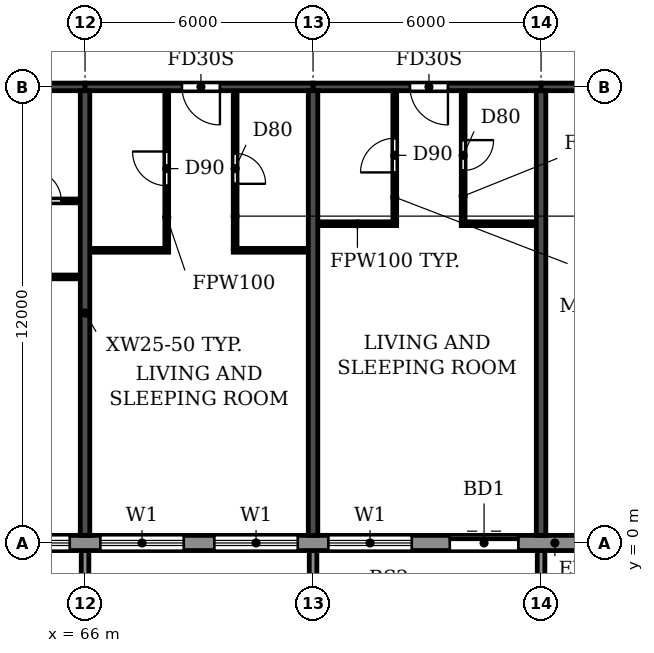
"""IFC4 building model, lengths in metres.
Left out: names, types, materials, properties, quantities, classifications, styles, units other than length and angle.
Written with IfcOpenShell. Run it as: python <this file> out.ifc"""

import sys

from ifc_helpers import new_model, si_unit, direction, frame, frame_2d, origin, place, context, subcontext, project, spatial, polyline, rectangle, outline, extrude, source, transform, mapped, element, fill, save


model = new_model("IFC4")
c1 = context("Model", 3, precision=1e-05, world=origin(), true_north=direction((0.0, 1.0)))
c2 = subcontext(c1, "Body", "Model", "MODEL_VIEW")
j1 = project(units=[si_unit("LENGTHUNIT", "METRE"), si_unit("PLANEANGLEUNIT", "RADIAN")], contexts=[c1])
p1 = place(None, origin())
s1 = spatial("IfcSite", under=j1, at=p1, CompositionType="ELEMENT")
p2 = place(p1, origin())
s2 = spatial("IfcBuilding", under=s1, at=p2, CompositionType="ELEMENT")
p3 = place(p2, frame((0.0, 0.0, 241.2)))
s3 = spatial("IfcBuildingStorey", under=s2, at=p3, CompositionType="ELEMENT", Elevation=241.2)
for number, where, z_axis, x_axis in (
    (1, (66.0, 0.2, 0.0), (0.0, 0.0, 1.0), (0.0, 1.0, 0.0)),
    (2, (72.0, 0.2, 0.0), (0.0, 0.0, 1.0), (0.0, 1.0, 0.0)),
    (3, (78.0, 0.2, 0.0), (0.0, 0.0, 1.0), (0.0, 1.0, 0.0)),
):
    element("IfcWall", number, at=place(p3, frame(where, z_axis=z_axis, x_axis=x_axis)), inside=s3, PredefinedType="SHEAR", context=c2, shape_type="SweptSolid", body=[
        extrude(rectangle(XDim=11.7, YDim=0.25, at=frame_2d((5.85, 0.0))), origin(), (0.0, 0.0, 1.0), 3.08),
    ])
p4 = place(p3, frame((60.0, 12.0, 0.0), z_axis=(0.0, 0.0, 1.0), x_axis=(1.0, 0.0, 0.0)))
e4 = element("IfcWall", 4, at=p4, inside=s3, PredefinedType="SHEAR", context=c2, shape_type="SweptSolid", body=[
    extrude(rectangle(XDim=6.0, YDim=0.2, at=frame_2d((3.0, 0.0))), origin(), (0.0, 0.0, 1.0), 2.48),
])
p5 = place(p4, frame((2.55, 0.0, 0.0)))
e5 = element("IfcOpeningElement", 5, at=p5, cuts=e4, PredefinedType="OPENING", context=c2, shape_type="SweptSolid", body=[
    extrude(rectangle(XDim=1.0, YDim=2.1, at=frame_2d((0.5, 1.05))), frame((0.0, 0.11, 0.0), z_axis=(0.0, -1.0, 0.0), x_axis=(1.0, 0.0, 0.0)), (0.0, 0.0, 1.0), 0.22),
])
p6 = place(p3, frame((66.0, 12.0, 0.0), z_axis=(0.0, 0.0, 1.0), x_axis=(1.0, 0.0, 0.0)))
e6 = element("IfcWall", 6, at=p6, inside=s3, PredefinedType="SHEAR", context=c2, shape_type="SweptSolid", body=[
    extrude(rectangle(XDim=6.0, YDim=0.2, at=frame_2d((3.0, 0.0))), origin(), (0.0, 0.0, 1.0), 2.48),
])
p7 = place(p6, frame((2.55, 0.0, 0.0)))
e7 = element("IfcOpeningElement", 7, at=p7, cuts=e6, PredefinedType="OPENING", context=c2, shape_type="SweptSolid", body=[
    extrude(rectangle(XDim=1.0, YDim=2.1, at=frame_2d((0.5, 1.05))), frame((0.0, 0.11, 0.0), z_axis=(0.0, -1.0, 0.0), x_axis=(1.0, 0.0, 0.0)), (0.0, 0.0, 1.0), 0.22),
])
p8 = place(p3, frame((72.0, 12.0, 0.0), z_axis=(0.0, 0.0, 1.0), x_axis=(1.0, 0.0, 0.0)))
e8 = element("IfcWall", 8, at=p8, inside=s3, PredefinedType="SHEAR", context=c2, shape_type="SweptSolid", body=[
    extrude(rectangle(XDim=6.0, YDim=0.2, at=frame_2d((3.0, 0.0))), origin(), (0.0, 0.0, 1.0), 2.48),
])
p9 = place(p8, frame((2.55, 0.0, 0.0)))
e9 = element("IfcOpeningElement", 9, at=p9, cuts=e8, PredefinedType="OPENING", context=c2, shape_type="SweptSolid", body=[
    extrude(rectangle(XDim=1.0, YDim=2.1, at=frame_2d((0.5, 1.05))), frame((0.0, 0.11, 0.0), z_axis=(0.0, -1.0, 0.0), x_axis=(1.0, 0.0, 0.0)), (0.0, 0.0, 1.0), 0.22),
])
p10 = place(p3, frame((78.0, 12.0, 0.0), z_axis=(0.0, 0.0, 1.0), x_axis=(1.0, 0.0, 0.0)))
e10 = element("IfcWall", 10, at=p10, inside=s3, PredefinedType="SHEAR", context=c2, shape_type="SweptSolid", body=[
    extrude(rectangle(XDim=5.8, YDim=0.2, at=frame_2d((2.9, 0.0))), origin(), (0.0, 0.0, 1.0), 2.48),
])
p11 = place(p10, frame((2.5, 0.0, 0.0)))
e11 = element("IfcOpeningElement", 11, at=p11, cuts=e10, PredefinedType="OPENING", context=c2, shape_type="SweptSolid", body=[
    extrude(rectangle(XDim=1.0, YDim=2.1, at=frame_2d((0.5, 1.05))), frame((0.0, 0.11, 0.0), z_axis=(0.0, -1.0, 0.0), x_axis=(1.0, 0.0, 0.0)), (0.0, 0.0, 1.0), 0.22),
])
p12 = place(p3, frame((22.683, 0.0, 0.0), z_axis=(0.0, 0.0, 1.0), x_axis=(1.0, 0.0, 0.0)))
e12 = element("IfcWall", 12, at=p12, inside=s3, PredefinedType="STANDARD", context=c2, shape_type="SweptSolid", body=[
    extrude(rectangle(XDim=56.634, YDim=0.4, at=frame_2d((28.317, 0.0))), origin(), (0.0, 0.0, 1.0), 3.08),
])
p13 = place(p12, frame((1.717, 0.0, 0.9)))
e13 = element("IfcOpeningElement", 13, at=p13, cuts=e12, PredefinedType="OPENING", context=c2, shape_type="SweptSolid", body=[
    extrude(rectangle(XDim=2.2, YDim=1.5, at=frame_2d((1.1, 0.75))), frame((0.0, 0.21, 0.0), z_axis=(0.0, -1.0, 0.0), x_axis=(1.0, 0.0, 0.0)), (0.0, 0.0, 1.0), 0.42),
])
p14 = place(p12, frame((4.917, 0.0, 0.0)))
e14 = element("IfcOpeningElement", 14, at=p14, cuts=e12, PredefinedType="OPENING", context=c2, shape_type="SweptSolid", body=[
    extrude(rectangle(XDim=1.8, YDim=2.4, at=frame_2d((0.9, 1.2))), frame((0.0, 0.21, 0.0), z_axis=(0.0, -1.0, 0.0), x_axis=(1.0, 0.0, 0.0)), (0.0, 0.0, 1.0), 0.42),
])
p15 = place(p12, frame((7.717, 0.0, 0.9)))
e15 = element("IfcOpeningElement", 15, at=p15, cuts=e12, PredefinedType="OPENING", context=c2, shape_type="SweptSolid", body=[
    extrude(rectangle(XDim=2.2, YDim=1.5, at=frame_2d((1.1, 0.75))), frame((0.0, 0.21, 0.0), z_axis=(0.0, -1.0, 0.0), x_axis=(1.0, 0.0, 0.0)), (0.0, 0.0, 1.0), 0.42),
])
p16 = place(p12, frame((10.717, 0.0, 0.9)))
e16 = element("IfcOpeningElement", 16, at=p16, cuts=e12, PredefinedType="OPENING", context=c2, shape_type="SweptSolid", body=[
    extrude(rectangle(XDim=2.2, YDim=1.5, at=frame_2d((1.1, 0.75))), frame((0.0, 0.21, 0.0), z_axis=(0.0, -1.0, 0.0), x_axis=(1.0, 0.0, 0.0)), (0.0, 0.0, 1.0), 0.42),
])
p17 = place(p12, frame((13.717, 0.0, 0.9)))
e17 = element("IfcOpeningElement", 17, at=p17, cuts=e12, PredefinedType="OPENING", context=c2, shape_type="SweptSolid", body=[
    extrude(rectangle(XDim=2.2, YDim=1.5, at=frame_2d((1.1, 0.75))), frame((0.0, 0.21, 0.0), z_axis=(0.0, -1.0, 0.0), x_axis=(1.0, 0.0, 0.0)), (0.0, 0.0, 1.0), 0.42),
])
p18 = place(p12, frame((16.917, 0.0, 0.0)))
e18 = element("IfcOpeningElement", 18, at=p18, cuts=e12, PredefinedType="OPENING", context=c2, shape_type="SweptSolid", body=[
    extrude(rectangle(XDim=1.8, YDim=2.4, at=frame_2d((0.9, 1.2))), frame((0.0, 0.21, 0.0), z_axis=(0.0, -1.0, 0.0), x_axis=(1.0, 0.0, 0.0)), (0.0, 0.0, 1.0), 0.42),
])
p19 = place(p12, frame((19.717, 0.0, 0.9)))
e19 = element("IfcOpeningElement", 19, at=p19, cuts=e12, PredefinedType="OPENING", context=c2, shape_type="SweptSolid", body=[
    extrude(rectangle(XDim=2.2, YDim=1.5, at=frame_2d((1.1, 0.75))), frame((0.0, 0.21, 0.0), z_axis=(0.0, -1.0, 0.0), x_axis=(1.0, 0.0, 0.0)), (0.0, 0.0, 1.0), 0.42),
])
p20 = place(p12, frame((22.717, 0.0, 0.9)))
e20 = element("IfcOpeningElement", 20, at=p20, cuts=e12, PredefinedType="OPENING", context=c2, shape_type="SweptSolid", body=[
    extrude(rectangle(XDim=2.2, YDim=1.5, at=frame_2d((1.1, 0.75))), frame((0.0, 0.21, 0.0), z_axis=(0.0, -1.0, 0.0), x_axis=(1.0, 0.0, 0.0)), (0.0, 0.0, 1.0), 0.42),
])
p21 = place(p12, frame((25.717, 0.0, 0.9)))
e21 = element("IfcOpeningElement", 21, at=p21, cuts=e12, PredefinedType="OPENING", context=c2, shape_type="SweptSolid", body=[
    extrude(rectangle(XDim=2.2, YDim=1.5, at=frame_2d((1.1, 0.75))), frame((0.0, 0.21, 0.0), z_axis=(0.0, -1.0, 0.0), x_axis=(1.0, 0.0, 0.0)), (0.0, 0.0, 1.0), 0.42),
])
p22 = place(p12, frame((28.717, 0.0, 0.9)))
e22 = element("IfcOpeningElement", 22, at=p22, cuts=e12, PredefinedType="OPENING", context=c2, shape_type="SweptSolid", body=[
    extrude(rectangle(XDim=2.2, YDim=1.5, at=frame_2d((1.1, 0.75))), frame((0.0, 0.21, 0.0), z_axis=(0.0, -1.0, 0.0), x_axis=(1.0, 0.0, 0.0)), (0.0, 0.0, 1.0), 0.42),
])
p23 = place(p12, frame((31.717, 0.0, 0.9)))
e23 = element("IfcOpeningElement", 23, at=p23, cuts=e12, PredefinedType="OPENING", context=c2, shape_type="SweptSolid", body=[
    extrude(rectangle(XDim=2.2, YDim=1.5, at=frame_2d((1.1, 0.75))), frame((0.0, 0.21, 0.0), z_axis=(0.0, -1.0, 0.0), x_axis=(1.0, 0.0, 0.0)), (0.0, 0.0, 1.0), 0.42),
])
p24 = place(p12, frame((34.717, 0.0, 0.9)))
e24 = element("IfcOpeningElement", 24, at=p24, cuts=e12, PredefinedType="OPENING", context=c2, shape_type="SweptSolid", body=[
    extrude(rectangle(XDim=2.2, YDim=1.5, at=frame_2d((1.1, 0.75))), frame((0.0, 0.21, 0.0), z_axis=(0.0, -1.0, 0.0), x_axis=(1.0, 0.0, 0.0)), (0.0, 0.0, 1.0), 0.42),
])
p25 = place(p12, frame((37.917, 0.0, 0.0)))
e25 = element("IfcOpeningElement", 25, at=p25, cuts=e12, PredefinedType="OPENING", context=c2, shape_type="SweptSolid", body=[
    extrude(rectangle(XDim=1.8, YDim=2.4, at=frame_2d((0.9, 1.2))), frame((0.0, 0.21, 0.0), z_axis=(0.0, -1.0, 0.0), x_axis=(1.0, 0.0, 0.0)), (0.0, 0.0, 1.0), 0.42),
])
p26 = place(p12, frame((40.717, 0.0, 0.9)))
e26 = element("IfcOpeningElement", 26, at=p26, cuts=e12, PredefinedType="OPENING", context=c2, shape_type="SweptSolid", body=[
    extrude(rectangle(XDim=2.2, YDim=1.5, at=frame_2d((1.1, 0.75))), frame((0.0, 0.21, 0.0), z_axis=(0.0, -1.0, 0.0), x_axis=(1.0, 0.0, 0.0)), (0.0, 0.0, 1.0), 0.42),
])
p27 = place(p12, frame((43.717, 0.0, 0.9)))
e27 = element("IfcOpeningElement", 27, at=p27, cuts=e12, PredefinedType="OPENING", context=c2, shape_type="SweptSolid", body=[
    extrude(rectangle(XDim=2.2, YDim=1.5, at=frame_2d((1.1, 0.75))), frame((0.0, 0.21, 0.0), z_axis=(0.0, -1.0, 0.0), x_axis=(1.0, 0.0, 0.0)), (0.0, 0.0, 1.0), 0.42),
])
p28 = place(p12, frame((46.717, 0.0, 0.9)))
e28 = element("IfcOpeningElement", 28, at=p28, cuts=e12, PredefinedType="OPENING", context=c2, shape_type="SweptSolid", body=[
    extrude(rectangle(XDim=2.2, YDim=1.5, at=frame_2d((1.1, 0.75))), frame((0.0, 0.21, 0.0), z_axis=(0.0, -1.0, 0.0), x_axis=(1.0, 0.0, 0.0)), (0.0, 0.0, 1.0), 0.42),
])
p29 = place(p12, frame((49.717, 0.0, 0.9)))
e29 = element("IfcOpeningElement", 29, at=p29, cuts=e12, PredefinedType="OPENING", context=c2, shape_type="SweptSolid", body=[
    extrude(rectangle(XDim=2.2, YDim=1.5, at=frame_2d((1.1, 0.75))), frame((0.0, 0.21, 0.0), z_axis=(0.0, -1.0, 0.0), x_axis=(1.0, 0.0, 0.0)), (0.0, 0.0, 1.0), 0.42),
])
p30 = place(p12, frame((52.917, 0.0, 0.0)))
e30 = element("IfcOpeningElement", 30, at=p30, cuts=e12, PredefinedType="OPENING", context=c2, shape_type="SweptSolid", body=[
    extrude(rectangle(XDim=1.8, YDim=2.4, at=frame_2d((0.9, 1.2))), frame((0.0, 0.21, 0.0), z_axis=(0.0, -1.0, 0.0), x_axis=(1.0, 0.0, 0.0)), (0.0, 0.0, 1.0), 0.42),
])
m1 = source(origin(), c2, "Body", "SweptSolid", [
    extrude(outline(polyline([(0.0, 0.0), (0.2, 0.0), (0.2, 1.65), (0.0, 1.65), (0.0, 0.0)])), origin(), (0.0, 0.0, 1.0), 3.1),
])
for number, where in (
    (31, (65.9, -1.85, 0.0)),
    (32, (71.9, -1.85, 0.0)),
    (33, (77.9, -1.85, 0.0)),
):
    element("IfcWall", number, at=place(p3, frame(where)), inside=s3, PredefinedType="STANDARD", context=c2, shape_type="MappedRepresentation", body=[
        mapped(m1, transform((0.0, 0.0, 0.0))),
    ])
p31 = place(p3, frame((62.95, 7.0, 0.0), z_axis=(0.0, 0.0, 1.0), x_axis=(1.0, 0.0, 0.0)))
e34 = element("IfcWall", 34, at=p31, inside=s3, PredefinedType="PARTITIONING", context=c2, shape_type="SweptSolid", body=[
    extrude(rectangle(XDim=2.915, YDim=0.1, at=frame_2d((1.458, 0.0))), origin(), (0.0, 0.0, 1.0), 3.08),
])
p32 = place(p31, frame((0.55, 0.0, 0.0)))
e35 = element("IfcOpeningElement", 35, at=p32, cuts=e34, PredefinedType="OPENING", context=c2, shape_type="SweptSolid", body=[
    extrude(rectangle(XDim=0.9, YDim=2.1, at=frame_2d((0.45, 1.05))), frame((0.0, 0.06, 0.0), z_axis=(0.0, -1.0, 0.0), x_axis=(1.0, 0.0, 0.0)), (0.0, 0.0, 1.0), 0.12),
])
p33 = place(p3, frame((66.135, 7.7, 0.0), z_axis=(0.0, 0.0, 1.0), x_axis=(1.0, 0.0, 0.0)))
e36 = element("IfcWall", 36, at=p33, inside=s3, PredefinedType="PARTITIONING", context=c2, shape_type="SweptSolid", body=[
    extrude(rectangle(XDim=2.065, YDim=0.1, at=frame_2d((1.032, 0.0))), origin(), (0.0, 0.0, 1.0), 3.08),
])
p34 = place(p3, frame((69.9, 7.7, 0.0), z_axis=(0.0, 0.0, 1.0), x_axis=(1.0, 0.0, 0.0)))
e37 = element("IfcWall", 37, at=p34, inside=s3, PredefinedType="PARTITIONING", context=c2, shape_type="SweptSolid", body=[
    extrude(rectangle(XDim=1.965, YDim=0.1, at=frame_2d((0.982, 0.0))), origin(), (0.0, 0.0, 1.0), 3.08),
])
p35 = place(p3, frame((72.135, 8.4, 0.0), z_axis=(0.0, 0.0, 1.0), x_axis=(1.0, 0.0, 0.0)))
e38 = element("IfcWall", 38, at=p35, inside=s3, PredefinedType="PARTITIONING", context=c2, shape_type="SweptSolid", body=[
    extrude(rectangle(XDim=2.065, YDim=0.1, at=frame_2d((1.032, 0.0))), origin(), (0.0, 0.0, 1.0), 3.08),
])
p36 = place(p3, frame((75.9, 8.4, 0.0), z_axis=(0.0, 0.0, 1.0), x_axis=(1.0, 0.0, 0.0)))
e39 = element("IfcWall", 39, at=p36, inside=s3, PredefinedType="PARTITIONING", context=c2, shape_type="SweptSolid", body=[
    extrude(rectangle(XDim=1.965, YDim=0.1, at=frame_2d((0.982, 0.0))), origin(), (0.0, 0.0, 1.0), 3.08),
])
p37 = place(p3, frame((63.9, 9.0, 0.0), z_axis=(0.0, 0.0, 1.0), x_axis=(1.0, 0.0, 0.0)))
e40 = element("IfcWall", 40, at=p37, inside=s3, PredefinedType="PARTITIONING", context=c2, shape_type="SweptSolid", body=[
    extrude(rectangle(XDim=1.965, YDim=0.1, at=frame_2d((0.982, 0.0))), origin(), (0.0, 0.0, 1.0), 3.08),
])
p38 = place(p37, frame((0.675, 0.0, 0.0)))
e41 = element("IfcOpeningElement", 41, at=p38, cuts=e40, PredefinedType="OPENING", context=c2, shape_type="SweptSolid", body=[
    extrude(rectangle(XDim=0.8, YDim=2.1, at=frame_2d((0.4, 1.05))), frame((0.0, 0.06, 0.0), z_axis=(0.0, -1.0, 0.0), x_axis=(1.0, 0.0, 0.0)), (0.0, 0.0, 1.0), 0.12),
])
p39 = place(p3, frame((68.15, 7.75, 0.0), z_axis=(0.0, 0.0, 1.0), x_axis=(0.0, 1.0, 0.0)))
e42 = element("IfcWall", 42, at=p39, inside=s3, PredefinedType="PARTITIONING", context=c2, shape_type="SweptSolid", body=[
    extrude(rectangle(XDim=4.14, YDim=0.1, at=frame_2d((2.07, 0.0))), origin(), (0.0, 0.0, 1.0), 3.08),
])
p40 = place(p39, frame((1.65, 0.0, 0.0)))
e43 = element("IfcOpeningElement", 43, at=p40, cuts=e42, PredefinedType="OPENING", context=c2, shape_type="SweptSolid", body=[
    extrude(rectangle(XDim=0.9, YDim=2.1, at=frame_2d((0.45, 1.05))), frame((0.0, 0.06, 0.0), z_axis=(0.0, -1.0, 0.0), x_axis=(1.0, 0.0, 0.0)), (0.0, 0.0, 1.0), 0.12),
])
p41 = place(p3, frame((69.95, 7.75, 0.0), z_axis=(0.0, 0.0, 1.0), x_axis=(0.0, 1.0, 0.0)))
e44 = element("IfcWall", 44, at=p41, inside=s3, PredefinedType="PARTITIONING", context=c2, shape_type="SweptSolid", body=[
    extrude(rectangle(XDim=4.14, YDim=0.1, at=frame_2d((2.07, 0.0))), origin(), (0.0, 0.0, 1.0), 3.08),
])
p42 = place(p41, frame((1.7, 0.0, 0.0)))
e45 = element("IfcOpeningElement", 45, at=p42, cuts=e44, PredefinedType="OPENING", context=c2, shape_type="SweptSolid", body=[
    extrude(rectangle(XDim=0.8, YDim=2.1, at=frame_2d((0.4, 1.05))), frame((0.0, 0.06, 0.0), z_axis=(0.0, -1.0, 0.0), x_axis=(1.0, 0.0, 0.0)), (0.0, 0.0, 1.0), 0.12),
])
p43 = place(p3, frame((74.15, 8.45, 0.0), z_axis=(0.0, 0.0, 1.0), x_axis=(0.0, 1.0, 0.0)))
e46 = element("IfcWall", 46, at=p43, inside=s3, PredefinedType="PARTITIONING", context=c2, shape_type="SweptSolid", body=[
    extrude(rectangle(XDim=3.44, YDim=0.1, at=frame_2d((1.72, 0.0))), origin(), (0.0, 0.0, 1.0), 3.08),
])
p44 = place(p43, frame((1.3, 0.0, 0.0)))
e47 = element("IfcOpeningElement", 47, at=p44, cuts=e46, PredefinedType="OPENING", context=c2, shape_type="SweptSolid", body=[
    extrude(rectangle(XDim=0.9, YDim=2.1, at=frame_2d((0.45, 1.05))), frame((0.0, 0.06, 0.0), z_axis=(0.0, -1.0, 0.0), x_axis=(1.0, 0.0, 0.0)), (0.0, 0.0, 1.0), 0.12),
])
p45 = place(p3, frame((75.95, 8.45, 0.0), z_axis=(0.0, 0.0, 1.0), x_axis=(0.0, 1.0, 0.0)))
e48 = element("IfcWall", 48, at=p45, inside=s3, PredefinedType="PARTITIONING", context=c2, shape_type="SweptSolid", body=[
    extrude(rectangle(XDim=3.44, YDim=0.1, at=frame_2d((1.72, 0.0))), origin(), (0.0, 0.0, 1.0), 3.08),
])
p46 = place(p45, frame((1.35, 0.0, 0.0)))
e49 = element("IfcOpeningElement", 49, at=p46, cuts=e48, PredefinedType="OPENING", context=c2, shape_type="SweptSolid", body=[
    extrude(rectangle(XDim=0.8, YDim=2.1, at=frame_2d((0.4, 1.05))), frame((0.0, 0.06, 0.0), z_axis=(0.0, -1.0, 0.0), x_axis=(1.0, 0.0, 0.0)), (0.0, 0.0, 1.0), 0.12),
])
p47 = place(p26, origin())
e50 = element("IfcWindow", 50, at=p47, inside=s3, PartitioningType="DOUBLE_PANEL_HORIZONTAL", PredefinedType="WINDOW", context=c2, shape_type="SweptSolid", body=[
    extrude(rectangle(XDim=2.2, YDim=1.5, at=frame_2d((1.1, 0.75))), frame((0.0, 0.03, 0.0), z_axis=(0.0, -1.0, 0.0), x_axis=(1.0, 0.0, 0.0)), (0.0, 0.0, 1.0), 0.06),
])
fill(e26, e50)
p48 = place(p27, origin())
e51 = element("IfcWindow", 51, at=p48, inside=s3, PartitioningType="DOUBLE_PANEL_HORIZONTAL", PredefinedType="WINDOW", context=c2, shape_type="SweptSolid", body=[
    extrude(rectangle(XDim=2.2, YDim=1.5, at=frame_2d((1.1, 0.75))), frame((0.0, 0.03, 0.0), z_axis=(0.0, -1.0, 0.0), x_axis=(1.0, 0.0, 0.0)), (0.0, 0.0, 1.0), 0.06),
])
fill(e27, e51)
p49 = place(p28, origin())
e52 = element("IfcWindow", 52, at=p49, inside=s3, PartitioningType="DOUBLE_PANEL_HORIZONTAL", PredefinedType="WINDOW", context=c2, shape_type="SweptSolid", body=[
    extrude(rectangle(XDim=2.2, YDim=1.5, at=frame_2d((1.1, 0.75))), frame((0.0, 0.03, 0.0), z_axis=(0.0, -1.0, 0.0), x_axis=(1.0, 0.0, 0.0)), (0.0, 0.0, 1.0), 0.06),
])
fill(e28, e52)
p50 = place(p29, origin())
e53 = element("IfcWindow", 53, at=p50, inside=s3, PartitioningType="DOUBLE_PANEL_HORIZONTAL", PredefinedType="WINDOW", context=c2, shape_type="SweptSolid", body=[
    extrude(rectangle(XDim=2.2, YDim=1.5, at=frame_2d((1.1, 0.75))), frame((0.0, 0.03, 0.0), z_axis=(0.0, -1.0, 0.0), x_axis=(1.0, 0.0, 0.0)), (0.0, 0.0, 1.0), 0.06),
])
fill(e29, e53)
p51 = place(p30, origin())
e54 = element("IfcDoor", 54, at=p51, inside=s3, OperationType="DOUBLE_DOOR_SLIDING", PredefinedType="DOOR", context=c2, shape_type="SweptSolid", body=[
    extrude(rectangle(XDim=1.8, YDim=2.4, at=frame_2d((0.9, 1.2))), frame((0.0, 0.025, 0.0), z_axis=(0.0, -1.0, 0.0), x_axis=(1.0, 0.0, 0.0)), (0.0, 0.0, 1.0), 0.05),
])
fill(e30, e54)
p52 = place(p38, origin())
e55 = element("IfcDoor", 55, at=p52, inside=s3, OperationType="SINGLE_SWING_LEFT", PredefinedType="DOOR", context=c2, shape_type="SweptSolid", body=[
    extrude(rectangle(XDim=0.8, YDim=2.1, at=frame_2d((0.4, 1.05))), frame((0.0, 0.025, 0.0), z_axis=(0.0, -1.0, 0.0), x_axis=(1.0, 0.0, 0.0)), (0.0, 0.0, 1.0), 0.05),
])
fill(e41, e55)
p53 = place(p40, origin())
e56 = element("IfcDoor", 56, at=p53, inside=s3, OperationType="SINGLE_SWING_RIGHT", PredefinedType="DOOR", context=c2, shape_type="SweptSolid", body=[
    extrude(rectangle(XDim=0.9, YDim=2.1, at=frame_2d((0.45, 1.05))), frame((0.0, 0.025, 0.0), z_axis=(0.0, -1.0, 0.0), x_axis=(1.0, 0.0, 0.0)), (0.0, 0.0, 1.0), 0.05),
])
fill(e43, e56)
p54 = place(p7, frame((1.0, 0.0, 0.0), z_axis=(0.0, 0.0, 1.0), x_axis=(-1.0, 0.0, 0.0)))
e57 = element("IfcDoor", 57, at=p54, inside=s3, OperationType="SINGLE_SWING_LEFT", PredefinedType="DOOR", context=c2, shape_type="SweptSolid", body=[
    extrude(rectangle(XDim=1.0, YDim=2.1, at=frame_2d((0.5, 1.05))), frame((0.0, 0.025, 0.0), z_axis=(0.0, -1.0, 0.0), x_axis=(1.0, 0.0, 0.0)), (0.0, 0.0, 1.0), 0.05),
])
fill(e7, e57)
p55 = place(p42, frame((0.8, 0.0, 0.0), z_axis=(0.0, 0.0, 1.0), x_axis=(-1.0, 0.0, 0.0)))
e58 = element("IfcDoor", 58, at=p55, inside=s3, OperationType="SINGLE_SWING_RIGHT", PredefinedType="DOOR", context=c2, shape_type="SweptSolid", body=[
    extrude(rectangle(XDim=0.8, YDim=2.1, at=frame_2d((0.4, 1.05))), frame((0.0, 0.025, 0.0), z_axis=(0.0, -1.0, 0.0), x_axis=(1.0, 0.0, 0.0)), (0.0, 0.0, 1.0), 0.05),
])
fill(e45, e58)
p56 = place(p44, origin())
e59 = element("IfcDoor", 59, at=p56, inside=s3, OperationType="SINGLE_SWING_LEFT", PredefinedType="DOOR", context=c2, shape_type="SweptSolid", body=[
    extrude(rectangle(XDim=0.9, YDim=2.1, at=frame_2d((0.45, 1.05))), frame((0.0, 0.025, 0.0), z_axis=(0.0, -1.0, 0.0), x_axis=(1.0, 0.0, 0.0)), (0.0, 0.0, 1.0), 0.05),
])
fill(e47, e59)
p57 = place(p9, frame((1.0, 0.0, 0.0), z_axis=(0.0, 0.0, 1.0), x_axis=(-1.0, 0.0, 0.0)))
e60 = element("IfcDoor", 60, at=p57, inside=s3, OperationType="SINGLE_SWING_LEFT", PredefinedType="DOOR", context=c2, shape_type="SweptSolid", body=[
    extrude(rectangle(XDim=1.0, YDim=2.1, at=frame_2d((0.5, 1.05))), frame((0.0, 0.025, 0.0), z_axis=(0.0, -1.0, 0.0), x_axis=(1.0, 0.0, 0.0)), (0.0, 0.0, 1.0), 0.05),
])
fill(e9, e60)
p58 = place(p46, frame((0.8, 0.0, 0.0), z_axis=(0.0, 0.0, 1.0), x_axis=(-1.0, 0.0, 0.0)))
e61 = element("IfcDoor", 61, at=p58, inside=s3, OperationType="SINGLE_SWING_LEFT", PredefinedType="DOOR", context=c2, shape_type="SweptSolid", body=[
    extrude(rectangle(XDim=0.8, YDim=2.1, at=frame_2d((0.4, 1.05))), frame((0.0, 0.025, 0.0), z_axis=(0.0, -1.0, 0.0), x_axis=(1.0, 0.0, 0.0)), (0.0, 0.0, 1.0), 0.05),
])
fill(e49, e61)
save(model, sys.argv[1])
